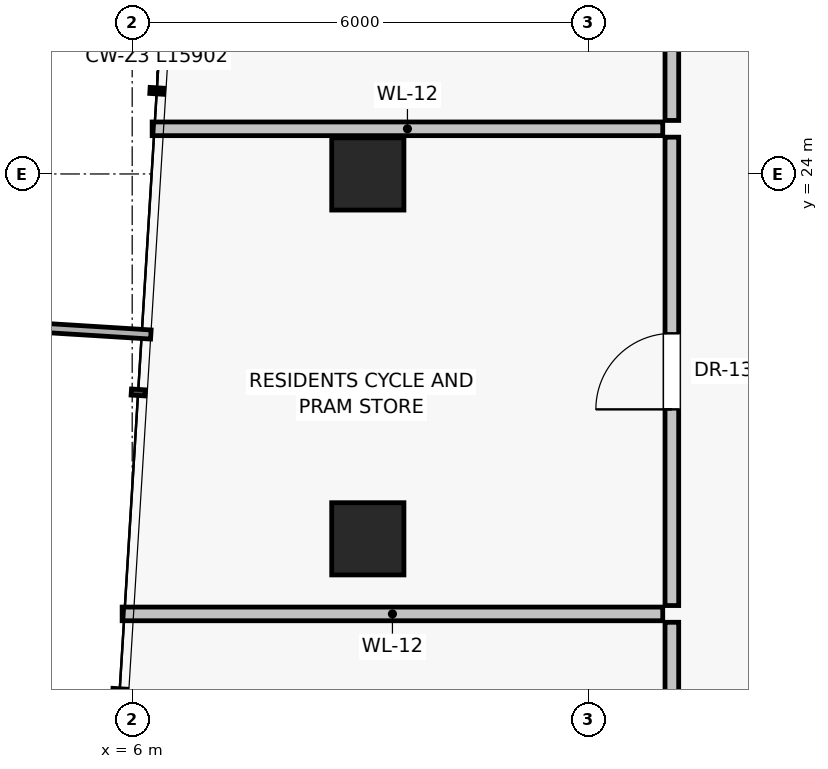
"""IFC4 building model, lengths in metres.
Left out: names, types, materials, properties, quantities, classifications, styles, units other than length and angle.
Written with IfcOpenShell. Run it as: python <this file> out.ifc"""

import sys

from ifc_helpers import new_model, si_unit, direction, frame, frame_2d, origin, origin_2d, place, context, subcontext, project, spatial, rectangle, extrude, source, transform, mapped, element, fill, save


model = new_model("IFC4")
c1 = context("Model", 3, precision=1e-05, world=origin(), true_north=direction((0.0, 1.0)))
c2 = subcontext(c1, "Body", "Model", "MODEL_VIEW")
j1 = project(units=[si_unit("LENGTHUNIT", "METRE"), si_unit("PLANEANGLEUNIT", "RADIAN")], contexts=[c1])
p1 = place(None, origin())
s1 = spatial("IfcSite", under=j1, at=p1, CompositionType="ELEMENT")
p2 = place(p1, origin())
s2 = spatial("IfcBuilding", under=s1, at=p2, CompositionType="ELEMENT")
p3 = place(p2, frame((0.0, 0.0, 218.9)))
s3 = spatial("IfcBuildingStorey", under=s2, at=p3, CompositionType="ELEMENT", Elevation=218.9)
for number, where, z_axis, x_axis in (
    (1, (9.1, 24.0, 0.0), (0.0, 0.0, 1.0), (1.0, 0.0, 0.0)),
    (2, (9.1, 19.2, 0.0), (0.0, 0.0, 1.0), (1.0, 0.0, 0.0)),
):
    element("IfcColumn", number, at=place(p3, frame(where, z_axis=z_axis, x_axis=x_axis)), inside=s3, PredefinedType="COLUMN", context=c2, shape_type="SweptSolid", body=[
        extrude(rectangle(XDim=0.95, YDim=0.95, at=origin_2d()), origin(), (0.0, 0.0, 1.0), 3.25),
    ])
p4 = place(p3, frame((13.1, 14.41, 0.0), z_axis=(0.0, 0.0, 1.0), x_axis=(0.0, 1.0, 0.0)))
e3 = element("IfcWall", 3, at=p4, inside=s3, PredefinedType="PARTITIONING", context=c2, shape_type="SweptSolid", body=[
    extrude(rectangle(XDim=3.692, YDim=0.18, at=frame_2d((1.846, 0.0))), origin(), (0.0, 0.0, 1.0), 2.662),
])
p5 = place(p4, frame((1.346, 0.0, 0.0)))
e4 = element("IfcOpeningElement", 4, at=p5, cuts=e3, PredefinedType="OPENING", context=c2, shape_type="SweptSolid", body=[
    extrude(rectangle(XDim=1.0, YDim=2.01, at=frame_2d((0.5, 1.005))), frame((0.0, 0.1, 0.0), z_axis=(0.0, -1.0, 0.0), x_axis=(1.0, 0.0, 0.0)), (0.0, 0.0, 1.0), 0.2),
])
p6 = place(p3, frame((13.1, 18.322, 0.0), z_axis=(0.0, 0.0, 1.0), x_axis=(0.0, 1.0, 0.0)))
e5 = element("IfcWall", 5, at=p6, inside=s3, PredefinedType="PARTITIONING", context=c2, shape_type="SweptSolid", body=[
    extrude(rectangle(XDim=6.162, YDim=0.18, at=frame_2d((3.081, 0.0))), origin(), (0.0, 0.0, 1.0), 2.662),
])
p7 = place(p6, frame((2.581, 0.0, 0.0)))
e6 = element("IfcOpeningElement", 6, at=p7, cuts=e5, PredefinedType="OPENING", context=c2, shape_type="SweptSolid", body=[
    extrude(rectangle(XDim=1.0, YDim=2.01, at=frame_2d((0.5, 1.005))), frame((0.0, 0.1, 0.0), z_axis=(0.0, -1.0, 0.0), x_axis=(1.0, 0.0, 0.0)), (0.0, 0.0, 1.0), 0.2),
])
p8 = place(p3, frame((12.98, 18.212, 0.0), z_axis=(0.0, 0.0, 1.0), x_axis=(-1.0, 0.0, 0.0)))
e7 = element("IfcWall", 7, at=p8, inside=s3, PredefinedType="PARTITIONING", context=c2, shape_type="SweptSolid", body=[
    extrude(rectangle(XDim=7.112, YDim=0.18, at=frame_2d((3.556, 0.0))), origin(), (0.0, 0.0, 1.0), 2.469),
])
p9 = place(p3, frame((12.98, 24.594, 0.0), z_axis=(0.0, 0.0, 1.0), x_axis=(-1.0, 0.0, 0.0)))
e8 = element("IfcWall", 8, at=p9, inside=s3, PredefinedType="PARTITIONING", context=c2, shape_type="SweptSolid", body=[
    extrude(rectangle(XDim=6.717, YDim=0.18, at=frame_2d((3.359, 0.0))), origin(), (0.0, 0.0, 1.0), 3.015),
])
p10 = place(p3, frame((13.1, 24.704, 0.0), z_axis=(0.0, 0.0, 1.0), x_axis=(0.0, 1.0, 0.0)))
e9 = element("IfcWall", 9, at=p10, inside=s3, PredefinedType="PARTITIONING", context=c2, shape_type="SweptSolid", body=[
    extrude(rectangle(XDim=3.164, YDim=0.18, at=frame_2d((1.582, 0.0))), origin(), (0.0, 0.0, 1.0), 2.662),
])
p11 = place(p10, frame((1.082, 0.0, 0.0)))
e10 = element("IfcOpeningElement", 10, at=p11, cuts=e9, PredefinedType="OPENING", context=c2, shape_type="SweptSolid", body=[
    extrude(rectangle(XDim=1.0, YDim=2.01, at=frame_2d((0.5, 1.005))), frame((0.0, 0.1, 0.0), z_axis=(0.0, -1.0, 0.0), x_axis=(1.0, 0.0, 0.0)), (0.0, 0.0, 1.0), 0.2),
])
m1 = source(origin(), c2, "Body", "SweptSolid", [
    extrude(rectangle(XDim=1.0, YDim=2.01, at=frame_2d((0.5, 1.005))), frame((0.0, 0.025, 0.0), z_axis=(0.0, -1.0, 0.0), x_axis=(1.0, 0.0, 0.0)), (0.0, 0.0, 1.0), 0.05),
])
p12 = place(p7, origin())
e11 = element("IfcDoor", 11, at=p12, inside=s3, OperationType="SINGLE_SWING_LEFT", PredefinedType="DOOR", context=c2, shape_type="MappedRepresentation", body=[
    mapped(m1, transform((0.0, 0.0, 0.0), scale=1.0)),
])
fill(e6, e11)
save(model, sys.argv[1])
